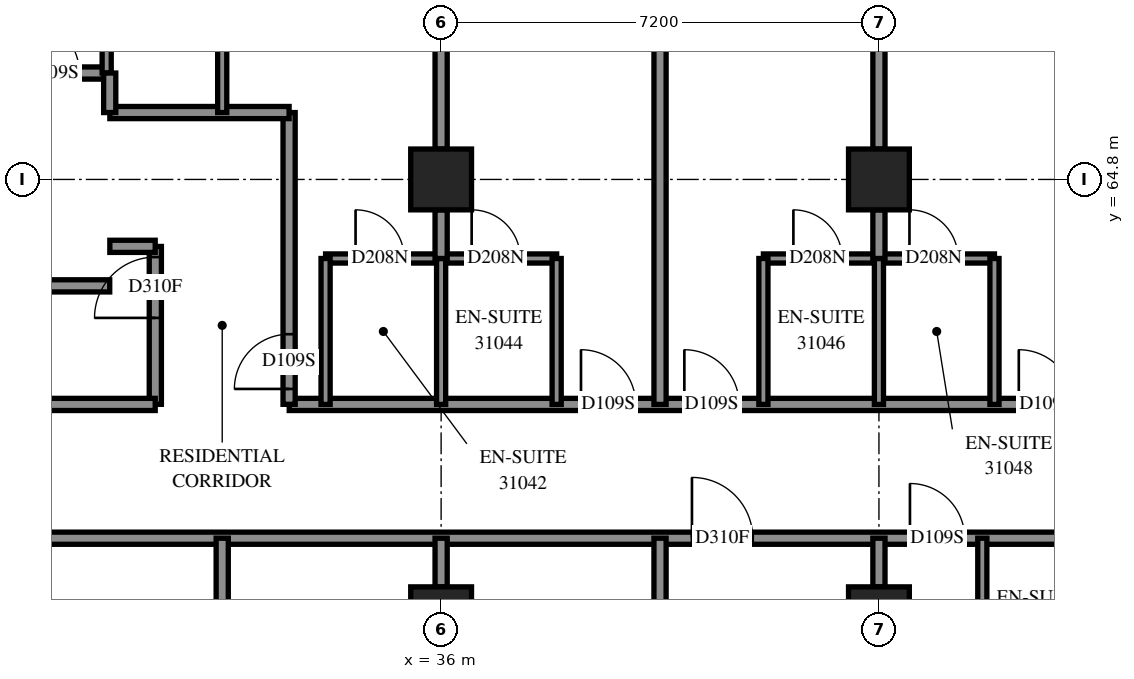
"""IFC4 building model, lengths in metres.
Left out: names, types, materials, properties, quantities, classifications, styles, units other than length and angle.
Written with IfcOpenShell. Run it as: python <this file> out.ifc"""

import sys

from ifc_helpers import new_model, si_unit, direction, frame, frame_2d, origin, origin_2d, place, context, subcontext, project, spatial, rectangle, extrude, element, fill, save


model = new_model("IFC4")
c1 = context("Model", 3, precision=1e-05, world=origin(), true_north=direction((0.0, 1.0)))
c2 = subcontext(c1, "Body", "Model", "MODEL_VIEW")
j1 = project(units=[si_unit("LENGTHUNIT", "METRE"), si_unit("PLANEANGLEUNIT", "RADIAN")], contexts=[c1])
p1 = place(None, origin())
s1 = spatial("IfcSite", under=j1, at=p1, CompositionType="ELEMENT")
p2 = place(p1, origin())
s2 = spatial("IfcBuilding", under=s1, at=p2, CompositionType="ELEMENT")
p3 = place(p2, frame((0.0, 0.0, 115.2)))
s3 = spatial("IfcBuildingStorey", under=s2, at=p3, CompositionType="ELEMENT", Elevation=115.2)
for number, where, z_axis, x_axis in (
    (1, (36.0, 57.6, 0.0), (0.0, 0.0, 1.0), (1.0, 0.0, 0.0)),
    (2, (36.0, 64.8, 0.0), (0.0, 0.0, 1.0), (1.0, 0.0, 0.0)),
    (3, (43.2, 57.6, 0.0), (0.0, 0.0, 1.0), (1.0, 0.0, 0.0)),
    (4, (43.2, 64.8, 0.0), (0.0, 0.0, 1.0), (1.0, 0.0, 0.0)),
):
    element("IfcColumn", number, at=place(p3, frame(where, z_axis=z_axis, x_axis=x_axis)), inside=s3, PredefinedType="COLUMN", context=c2, shape_type="SweptSolid", body=[
        extrude(rectangle(XDim=1.0, YDim=1.0, at=origin_2d()), origin(), (0.0, 0.0, 1.0), 3.1),
    ])
p4 = place(p3, frame((28.802, 58.9, 0.0), z_axis=(0.0, 0.0, 1.0), x_axis=(1.0, 0.0, 0.0)))
e5 = element("IfcWall", 5, at=p4, inside=s3, PredefinedType="PARTITIONING", context=c2, shape_type="SweptSolid", body=[
    extrude(rectangle(XDim=24.098, YDim=0.2, at=frame_2d((12.049, 0.0))), origin(), (0.0, 0.0, 1.0), 3.1),
])
p5 = place(p4, frame((11.323, 0.0, 0.0)))
e6 = element("IfcOpeningElement", 6, at=p5, cuts=e5, PredefinedType="OPENING", context=c2, shape_type="SweptSolid", body=[
    extrude(rectangle(XDim=1.0, YDim=2.1, at=frame_2d((0.5, 1.05))), frame((0.0, 0.11, 0.0), z_axis=(0.0, -1.0, 0.0), x_axis=(1.0, 0.0, 0.0)), (0.0, 0.0, 1.0), 0.22),
])
p6 = place(p4, frame((14.908, 0.0, 0.0)))
e7 = element("IfcOpeningElement", 7, at=p6, cuts=e5, PredefinedType="OPENING", context=c2, shape_type="SweptSolid", body=[
    extrude(rectangle(XDim=0.9, YDim=2.1, at=frame_2d((0.45, 1.05))), frame((0.0, 0.11, 0.0), z_axis=(0.0, -1.0, 0.0), x_axis=(1.0, 0.0, 0.0)), (0.0, 0.0, 1.0), 0.22),
])
p7 = place(p4, frame((18.523, 0.0, 0.0)))
e8 = element("IfcOpeningElement", 8, at=p7, cuts=e5, PredefinedType="OPENING", context=c2, shape_type="SweptSolid", body=[
    extrude(rectangle(XDim=1.0, YDim=2.1, at=frame_2d((0.5, 1.05))), frame((0.0, 0.11, 0.0), z_axis=(0.0, -1.0, 0.0), x_axis=(1.0, 0.0, 0.0)), (0.0, 0.0, 1.0), 0.22),
])
p8 = place(p4, frame((22.845, 0.0, 0.0)))
e9 = element("IfcOpeningElement", 9, at=p8, cuts=e5, PredefinedType="OPENING", context=c2, shape_type="SweptSolid", body=[
    extrude(rectangle(XDim=1.0, YDim=2.1, at=frame_2d((0.5, 1.05))), frame((0.0, 0.11, 0.0), z_axis=(0.0, -1.0, 0.0), x_axis=(1.0, 0.0, 0.0)), (0.0, 0.0, 1.0), 0.22),
])
p9 = place(p3, frame((33.502, 61.1, 0.0), z_axis=(0.0, 0.0, 1.0), x_axis=(1.0, 0.0, 0.0)))
e10 = element("IfcWall", 10, at=p9, inside=s3, PredefinedType="PARTITIONING", context=c2, shape_type="SweptSolid", body=[
    extrude(rectangle(XDim=21.198, YDim=0.2, at=frame_2d((10.599, 0.0))), origin(), (0.0, 0.0, 1.0), 3.1),
])
p10 = place(p9, frame((4.798, 0.0, 0.0)))
e11 = element("IfcOpeningElement", 11, at=p10, cuts=e10, PredefinedType="OPENING", context=c2, shape_type="SweptSolid", body=[
    extrude(rectangle(XDim=0.9, YDim=2.1, at=frame_2d((0.45, 1.05))), frame((0.0, 0.11, 0.0), z_axis=(0.0, -1.0, 0.0), x_axis=(1.0, 0.0, 0.0)), (0.0, 0.0, 1.0), 0.22),
])
p11 = place(p9, frame((6.498, 0.0, 0.0)))
e12 = element("IfcOpeningElement", 12, at=p11, cuts=e10, PredefinedType="OPENING", context=c2, shape_type="SweptSolid", body=[
    extrude(rectangle(XDim=0.9, YDim=2.1, at=frame_2d((0.45, 1.05))), frame((0.0, 0.11, 0.0), z_axis=(0.0, -1.0, 0.0), x_axis=(1.0, 0.0, 0.0)), (0.0, 0.0, 1.0), 0.22),
])
p12 = place(p9, frame((11.998, 0.0, 0.0)))
e13 = element("IfcOpeningElement", 13, at=p12, cuts=e10, PredefinedType="OPENING", context=c2, shape_type="SweptSolid", body=[
    extrude(rectangle(XDim=0.9, YDim=2.1, at=frame_2d((0.45, 1.05))), frame((0.0, 0.11, 0.0), z_axis=(0.0, -1.0, 0.0), x_axis=(1.0, 0.0, 0.0)), (0.0, 0.0, 1.0), 0.22),
])
p13 = place(p9, frame((13.698, 0.0, 0.0)))
e14 = element("IfcOpeningElement", 14, at=p13, cuts=e10, PredefinedType="OPENING", context=c2, shape_type="SweptSolid", body=[
    extrude(rectangle(XDim=0.9, YDim=2.1, at=frame_2d((0.45, 1.05))), frame((0.0, 0.11, 0.0), z_axis=(0.0, -1.0, 0.0), x_axis=(1.0, 0.0, 0.0)), (0.0, 0.0, 1.0), 0.22),
])
p14 = place(p9, frame((19.198, 0.0, 0.0)))
e15 = element("IfcOpeningElement", 15, at=p14, cuts=e10, PredefinedType="OPENING", context=c2, shape_type="SweptSolid", body=[
    extrude(rectangle(XDim=0.9, YDim=2.1, at=frame_2d((0.45, 1.05))), frame((0.0, 0.11, 0.0), z_axis=(0.0, -1.0, 0.0), x_axis=(1.0, 0.0, 0.0)), (0.0, 0.0, 1.0), 0.22),
])
p15 = place(p3, frame((39.6, 61.1, 0.0), z_axis=(0.0, 0.0, 1.0), x_axis=(0.0, 1.0, 0.0)))
e16 = element("IfcWall", 16, at=p15, inside=s3, PredefinedType="PARTITIONING", context=c2, shape_type="SweptSolid", body=[
    extrude(rectangle(XDim=11.755, YDim=0.2, at=frame_2d((5.878, 0.0))), origin(), (0.0, 0.0, 1.0), 3.1),
])
for number, where, z_axis, x_axis in (
    (17, (36.0, 65.3, 0.0), (0.0, 0.0, 1.0), (0.0, 1.0, 0.0)),
    (18, (43.2, 65.3, 0.0), (0.0, 0.0, 1.0), (0.0, 1.0, 0.0)),
):
    element("IfcWall", number, at=place(p3, frame(where, z_axis=z_axis, x_axis=x_axis)), inside=s3, PredefinedType="PARTITIONING", context=c2, shape_type="SweptSolid", body=[
        extrude(rectangle(XDim=6.2, YDim=0.2, at=frame_2d((3.1, 0.0))), origin(), (0.0, 0.0, 1.0), 3.1),
    ])
p16 = place(p3, frame((33.5, 61.102, 0.0), z_axis=(0.0, 0.0, 1.0), x_axis=(0.0, 1.0, 0.0)))
e19 = element("IfcWall", 19, at=p16, inside=s3, PredefinedType="PARTITIONING", context=c2, shape_type="SweptSolid", body=[
    extrude(rectangle(XDim=4.798, YDim=0.2, at=frame_2d((2.399, 0.0))), origin(), (0.0, 0.0, 1.0), 3.1),
])
p17 = place(p16, frame((0.253, 0.0, 0.0)))
e20 = element("IfcOpeningElement", 20, at=p17, cuts=e19, PredefinedType="OPENING", context=c2, shape_type="SweptSolid", body=[
    extrude(rectangle(XDim=0.9, YDim=2.1, at=frame_2d((0.45, 1.05))), frame((0.0, 0.11, 0.0), z_axis=(0.0, -1.0, 0.0), x_axis=(1.0, 0.0, 0.0)), (0.0, 0.0, 1.0), 0.22),
])
p18 = place(p3, frame((41.3, 63.5, 0.0), z_axis=(0.0, 0.0, 1.0), x_axis=(1.0, 0.0, 0.0)))
e21 = element("IfcWall", 21, at=p18, inside=s3, PredefinedType="PARTITIONING", context=c2, shape_type="SweptSolid", body=[
    extrude(rectangle(XDim=3.8, YDim=0.15, at=frame_2d((1.9, 0.0))), origin(), (0.0, 0.0, 1.0), 3.1),
])
p19 = place(p18, frame((0.493, 0.0, 0.0)))
e22 = element("IfcOpeningElement", 22, at=p19, cuts=e21, PredefinedType="OPENING", context=c2, shape_type="SweptSolid", body=[
    extrude(rectangle(XDim=0.8, YDim=2.1, at=frame_2d((0.4, 1.05))), frame((0.0, 0.085, 0.0), z_axis=(0.0, -1.0, 0.0), x_axis=(1.0, 0.0, 0.0)), (0.0, 0.0, 1.0), 0.17),
])
p20 = place(p18, frame((2.402, 0.0, 0.0)))
e23 = element("IfcOpeningElement", 23, at=p20, cuts=e21, PredefinedType="OPENING", context=c2, shape_type="SweptSolid", body=[
    extrude(rectangle(XDim=0.8, YDim=2.1, at=frame_2d((0.4, 1.05))), frame((0.0, 0.085, 0.0), z_axis=(0.0, -1.0, 0.0), x_axis=(1.0, 0.0, 0.0)), (0.0, 0.0, 1.0), 0.17),
])
p21 = place(p3, frame((34.1, 63.5, 0.0), z_axis=(0.0, 0.0, 1.0), x_axis=(1.0, 0.0, 0.0)))
e24 = element("IfcWall", 24, at=p21, inside=s3, PredefinedType="PARTITIONING", context=c2, shape_type="SweptSolid", body=[
    extrude(rectangle(XDim=3.8, YDim=0.15, at=frame_2d((1.9, 0.0))), origin(), (0.0, 0.0, 1.0), 3.1),
])
p22 = place(p21, frame((0.493, 0.0, 0.0)))
e25 = element("IfcOpeningElement", 25, at=p22, cuts=e24, PredefinedType="OPENING", context=c2, shape_type="SweptSolid", body=[
    extrude(rectangle(XDim=0.8, YDim=2.1, at=frame_2d((0.4, 1.05))), frame((0.0, 0.085, 0.0), z_axis=(0.0, -1.0, 0.0), x_axis=(1.0, 0.0, 0.0)), (0.0, 0.0, 1.0), 0.17),
])
p23 = place(p21, frame((2.402, 0.0, 0.0)))
e26 = element("IfcOpeningElement", 26, at=p23, cuts=e24, PredefinedType="OPENING", context=c2, shape_type="SweptSolid", body=[
    extrude(rectangle(XDim=0.8, YDim=2.1, at=frame_2d((0.4, 1.05))), frame((0.0, 0.085, 0.0), z_axis=(0.0, -1.0, 0.0), x_axis=(1.0, 0.0, 0.0)), (0.0, 0.0, 1.0), 0.17),
])
p24 = place(p3, frame((27.1, 66.55, 0.0), z_axis=(0.0, 0.0, 1.0), x_axis=(1.0, 0.0, 0.0)))
e27 = element("IfcWall", 27, at=p24, inside=s3, PredefinedType="PARTITIONING", context=c2, shape_type="SweptSolid", body=[
    extrude(rectangle(XDim=3.4, YDim=0.2, at=frame_2d((1.7, 0.0))), origin(), (0.0, 0.0, 1.0), 3.1),
])
p25 = place(p24, frame((0.4, 0.0, 0.0)))
e28 = element("IfcOpeningElement", 28, at=p25, cuts=e27, PredefinedType="OPENING", context=c2, shape_type="SweptSolid", body=[
    extrude(rectangle(XDim=0.9, YDim=2.1, at=frame_2d((0.45, 1.05))), frame((0.0, 0.11, 0.0), z_axis=(0.0, -1.0, 0.0), x_axis=(1.0, 0.0, 0.0)), (0.0, 0.0, 1.0), 0.22),
])
p26 = place(p24, frame((2.05, 0.0, 0.0)))
e29 = element("IfcOpeningElement", 29, at=p26, cuts=e27, PredefinedType="OPENING", context=c2, shape_type="SweptSolid", body=[
    extrude(rectangle(XDim=0.9, YDim=2.1, at=frame_2d((0.45, 1.05))), frame((0.0, 0.11, 0.0), z_axis=(0.0, -1.0, 0.0), x_axis=(1.0, 0.0, 0.0)), (0.0, 0.0, 1.0), 0.22),
])
for number, where, z_axis, x_axis in (
    (30, (32.4, 55.747, 0.0), (0.0, 0.0, 1.0), (0.0, 1.0, 0.0)),
    (31, (39.6, 55.747, 0.0), (0.0, 0.0, 1.0), (0.0, 1.0, 0.0)),
):
    element("IfcWall", number, at=place(p3, frame(where, z_axis=z_axis, x_axis=x_axis)), inside=s3, PredefinedType="PARTITIONING", context=c2, shape_type="SweptSolid", body=[
        extrude(rectangle(XDim=3.153, YDim=0.2, at=frame_2d((1.577, 0.0))), origin(), (0.0, 0.0, 1.0), 3.1),
    ])
p27 = place(p3, frame((30.552, 65.9, 0.0), z_axis=(0.0, 0.0, 1.0), x_axis=(1.0, 0.0, 0.0)))
e32 = element("IfcWall", 32, at=p27, inside=s3, PredefinedType="PARTITIONING", context=c2, shape_type="SweptSolid", body=[
    extrude(rectangle(XDim=2.948, YDim=0.2, at=frame_2d((1.474, 0.0))), origin(), (0.0, 0.0, 1.0), 3.1),
])
p28 = place(p3, frame((31.3, 61.102, 0.0), z_axis=(0.0, 0.0, 1.0), x_axis=(0.0, 1.0, 0.0)))
e33 = element("IfcWall", 33, at=p28, inside=s3, PredefinedType="PARTITIONING", context=c2, shape_type="SweptSolid", body=[
    extrude(rectangle(XDim=2.596, YDim=0.2, at=frame_2d((1.298, 0.0))), origin(), (0.0, 0.0, 1.0), 3.1),
])
p29 = place(p28, frame((1.421, 0.0, 0.0)))
e34 = element("IfcOpeningElement", 34, at=p29, cuts=e33, PredefinedType="OPENING", context=c2, shape_type="SweptSolid", body=[
    extrude(rectangle(XDim=1.0, YDim=2.1, at=frame_2d((0.5, 1.05))), frame((0.0, 0.11, 0.0), z_axis=(0.0, -1.0, 0.0), x_axis=(1.0, 0.0, 0.0)), (0.0, 0.0, 1.0), 0.22),
])
p30 = place(p3, frame((28.802, 61.1, 0.0), z_axis=(0.0, 0.0, 1.0), x_axis=(1.0, 0.0, 0.0)))
e35 = element("IfcWall", 35, at=p30, inside=s3, PredefinedType="PARTITIONING", context=c2, shape_type="SweptSolid", body=[
    extrude(rectangle(XDim=2.496, YDim=0.2, at=frame_2d((1.248, 0.0))), origin(), (0.0, 0.0, 1.0), 3.1),
])
for number, where, z_axis, x_axis in (
    (36, (34.1, 61.1, 0.0), (0.0, 0.0, 1.0), (0.0, 1.0, 0.0)),
    (37, (36.0, 61.1, 0.0), (0.0, 0.0, 1.0), (0.0, 1.0, 0.0)),
    (38, (37.9, 61.1, 0.0), (0.0, 0.0, 1.0), (0.0, 1.0, 0.0)),
    (39, (41.3, 61.1, 0.0), (0.0, 0.0, 1.0), (0.0, 1.0, 0.0)),
    (40, (43.2, 61.1, 0.0), (0.0, 0.0, 1.0), (0.0, 1.0, 0.0)),
    (41, (45.1, 61.1, 0.0), (0.0, 0.0, 1.0), (0.0, 1.0, 0.0)),
    (42, (44.9, 56.5, 0.0), (0.0, 0.0, 1.0), (0.0, 1.0, 0.0)),
    (43, (32.4, 65.9, 0.0), (0.0, 0.0, 1.0), (0.0, 1.0, 0.0)),
):
    element("IfcWall", number, at=place(p3, frame(where, z_axis=z_axis, x_axis=x_axis)), inside=s3, PredefinedType="PARTITIONING", context=c2, shape_type="SweptSolid", body=[
        extrude(rectangle(XDim=2.4, YDim=0.15, at=frame_2d((1.2, 0.0))), origin(), (0.0, 0.0, 1.0), 3.1),
    ])
p31 = place(p3, frame((28.15, 63.05, 0.0), z_axis=(0.0, 0.0, 1.0), x_axis=(1.0, 0.0, 0.0)))
e44 = element("IfcWall", 44, at=p31, inside=s3, PredefinedType="PARTITIONING", context=c2, shape_type="SweptSolid", body=[
    extrude(rectangle(XDim=2.4, YDim=0.2, at=frame_2d((1.2, 0.0))), origin(), (0.0, 0.0, 1.0), 3.1),
])
p32 = place(p3, frame((30.5, 66.55, 0.0), z_axis=(0.0, 0.0, 1.0), x_axis=(0.0, 1.0, 0.0)))
e45 = element("IfcWall", 45, at=p32, inside=s3, PredefinedType="PARTITIONING", context=c2, shape_type="SweptSolid", body=[
    extrude(rectangle(XDim=1.75, YDim=0.15, at=frame_2d((0.875, 0.0))), origin(), (0.0, 0.0, 1.0), 3.1),
])
for number, where, z_axis, x_axis in (
    (46, (36.0, 58.1, 0.0), (0.0, 0.0, 1.0), (0.0, 1.0, 0.0)),
    (47, (36.0, 63.5, 0.0), (0.0, 0.0, 1.0), (0.0, 1.0, 0.0)),
    (48, (43.2, 58.1, 0.0), (0.0, 0.0, 1.0), (0.0, 1.0, 0.0)),
    (49, (43.2, 63.5, 0.0), (0.0, 0.0, 1.0), (0.0, 1.0, 0.0)),
):
    element("IfcWall", number, at=place(p3, frame(where, z_axis=z_axis, x_axis=x_axis)), inside=s3, PredefinedType="PARTITIONING", context=c2, shape_type="SweptSolid", body=[
        extrude(rectangle(XDim=0.8, YDim=0.2, at=frame_2d((0.4, 0.0))), origin(), (0.0, 0.0, 1.0), 3.1),
    ])
p33 = place(p3, frame((30.552, 63.7, 0.0), z_axis=(0.0, 0.0, 1.0), x_axis=(1.0, 0.0, 0.0)))
e50 = element("IfcWall", 50, at=p33, inside=s3, PredefinedType="PARTITIONING", context=c2, shape_type="SweptSolid", body=[
    extrude(rectangle(XDim=0.746, YDim=0.2, at=frame_2d((0.373, 0.0))), origin(), (0.0, 0.0, 1.0), 3.1),
])
p34 = place(p3, frame((30.55, 65.9, 0.0), z_axis=(0.0, 0.0, 1.0), x_axis=(0.0, 1.0, 0.0)))
e51 = element("IfcWall", 51, at=p34, inside=s3, PredefinedType="PARTITIONING", context=c2, shape_type="SweptSolid", body=[
    extrude(rectangle(XDim=0.65, YDim=0.2, at=frame_2d((0.325, 0.0))), origin(), (0.0, 0.0, 1.0), 3.1),
])
p35 = place(p29, origin())
e52 = element("IfcDoor", 52, at=p35, inside=s3, OperationType="SINGLE_SWING_LEFT", PredefinedType="DOOR", context=c2, shape_type="SweptSolid", body=[
    extrude(rectangle(XDim=1.0, YDim=2.1, at=frame_2d((0.5, 1.05))), frame((0.0, 0.025, 0.0), z_axis=(0.0, -1.0, 0.0), x_axis=(1.0, 0.0, 0.0)), (0.0, 0.0, 1.0), 0.05),
])
fill(e34, e52)
p36 = place(p5, origin())
e53 = element("IfcDoor", 53, at=p36, inside=s3, OperationType="SINGLE_SWING_RIGHT", PredefinedType="DOOR", context=c2, shape_type="SweptSolid", body=[
    extrude(rectangle(XDim=1.0, YDim=2.1, at=frame_2d((0.5, 1.05))), frame((0.0, 0.025, 0.0), z_axis=(0.0, -1.0, 0.0), x_axis=(1.0, 0.0, 0.0)), (0.0, 0.0, 1.0), 0.05),
])
fill(e6, e53)
p37 = place(p6, origin())
e54 = element("IfcDoor", 54, at=p37, inside=s3, OperationType="SINGLE_SWING_LEFT", PredefinedType="DOOR", context=c2, shape_type="SweptSolid", body=[
    extrude(rectangle(XDim=0.9, YDim=2.1, at=frame_2d((0.45, 1.05))), frame((0.0, 0.025, 0.0), z_axis=(0.0, -1.0, 0.0), x_axis=(1.0, 0.0, 0.0)), (0.0, 0.0, 1.0), 0.05),
])
fill(e7, e54)
p38 = place(p26, origin())
e55 = element("IfcDoor", 55, at=p38, inside=s3, OperationType="SINGLE_SWING_RIGHT", PredefinedType="DOOR", context=c2, shape_type="SweptSolid", body=[
    extrude(rectangle(XDim=0.9, YDim=2.1, at=frame_2d((0.45, 1.05))), frame((0.0, 0.025, 0.0), z_axis=(0.0, -1.0, 0.0), x_axis=(1.0, 0.0, 0.0)), (0.0, 0.0, 1.0), 0.05),
])
fill(e29, e55)
p39 = place(p17, origin())
e56 = element("IfcDoor", 56, at=p39, inside=s3, OperationType="SINGLE_SWING_LEFT", PredefinedType="DOOR", context=c2, shape_type="SweptSolid", body=[
    extrude(rectangle(XDim=0.9, YDim=2.1, at=frame_2d((0.45, 1.05))), frame((0.0, 0.025, 0.0), z_axis=(0.0, -1.0, 0.0), x_axis=(1.0, 0.0, 0.0)), (0.0, 0.0, 1.0), 0.05),
])
fill(e20, e56)
p40 = place(p22, origin())
e57 = element("IfcDoor", 57, at=p40, inside=s3, OperationType="SINGLE_SWING_RIGHT", PredefinedType="DOOR", context=c2, shape_type="SweptSolid", body=[
    extrude(rectangle(XDim=0.8, YDim=2.1, at=frame_2d((0.4, 1.05))), frame((0.0, 0.025, 0.0), z_axis=(0.0, -1.0, 0.0), x_axis=(1.0, 0.0, 0.0)), (0.0, 0.0, 1.0), 0.05),
])
fill(e25, e57)
p41 = place(p10, origin())
e58 = element("IfcDoor", 58, at=p41, inside=s3, OperationType="SINGLE_SWING_RIGHT", PredefinedType="DOOR", context=c2, shape_type="SweptSolid", body=[
    extrude(rectangle(XDim=0.9, YDim=2.1, at=frame_2d((0.45, 1.05))), frame((0.0, 0.025, 0.0), z_axis=(0.0, -1.0, 0.0), x_axis=(1.0, 0.0, 0.0)), (0.0, 0.0, 1.0), 0.05),
])
fill(e11, e58)
p42 = place(p23, origin())
e59 = element("IfcDoor", 59, at=p42, inside=s3, OperationType="SINGLE_SWING_RIGHT", PredefinedType="DOOR", context=c2, shape_type="SweptSolid", body=[
    extrude(rectangle(XDim=0.8, YDim=2.1, at=frame_2d((0.4, 1.05))), frame((0.0, 0.025, 0.0), z_axis=(0.0, -1.0, 0.0), x_axis=(1.0, 0.0, 0.0)), (0.0, 0.0, 1.0), 0.05),
])
fill(e26, e59)
p43 = place(p11, origin())
e60 = element("IfcDoor", 60, at=p43, inside=s3, OperationType="SINGLE_SWING_LEFT", PredefinedType="DOOR", context=c2, shape_type="SweptSolid", body=[
    extrude(rectangle(XDim=0.9, YDim=2.1, at=frame_2d((0.45, 1.05))), frame((0.0, 0.025, 0.0), z_axis=(0.0, -1.0, 0.0), x_axis=(1.0, 0.0, 0.0)), (0.0, 0.0, 1.0), 0.05),
])
fill(e12, e60)
p44 = place(p19, origin())
e61 = element("IfcDoor", 61, at=p44, inside=s3, OperationType="SINGLE_SWING_RIGHT", PredefinedType="DOOR", context=c2, shape_type="SweptSolid", body=[
    extrude(rectangle(XDim=0.8, YDim=2.1, at=frame_2d((0.4, 1.05))), frame((0.0, 0.025, 0.0), z_axis=(0.0, -1.0, 0.0), x_axis=(1.0, 0.0, 0.0)), (0.0, 0.0, 1.0), 0.05),
])
fill(e22, e61)
p45 = place(p12, origin())
e62 = element("IfcDoor", 62, at=p45, inside=s3, OperationType="SINGLE_SWING_RIGHT", PredefinedType="DOOR", context=c2, shape_type="SweptSolid", body=[
    extrude(rectangle(XDim=0.9, YDim=2.1, at=frame_2d((0.45, 1.05))), frame((0.0, 0.025, 0.0), z_axis=(0.0, -1.0, 0.0), x_axis=(1.0, 0.0, 0.0)), (0.0, 0.0, 1.0), 0.05),
])
fill(e13, e62)
p46 = place(p20, origin())
e63 = element("IfcDoor", 63, at=p46, inside=s3, OperationType="SINGLE_SWING_RIGHT", PredefinedType="DOOR", context=c2, shape_type="SweptSolid", body=[
    extrude(rectangle(XDim=0.8, YDim=2.1, at=frame_2d((0.4, 1.05))), frame((0.0, 0.025, 0.0), z_axis=(0.0, -1.0, 0.0), x_axis=(1.0, 0.0, 0.0)), (0.0, 0.0, 1.0), 0.05),
])
fill(e23, e63)
save(model, sys.argv[1])
